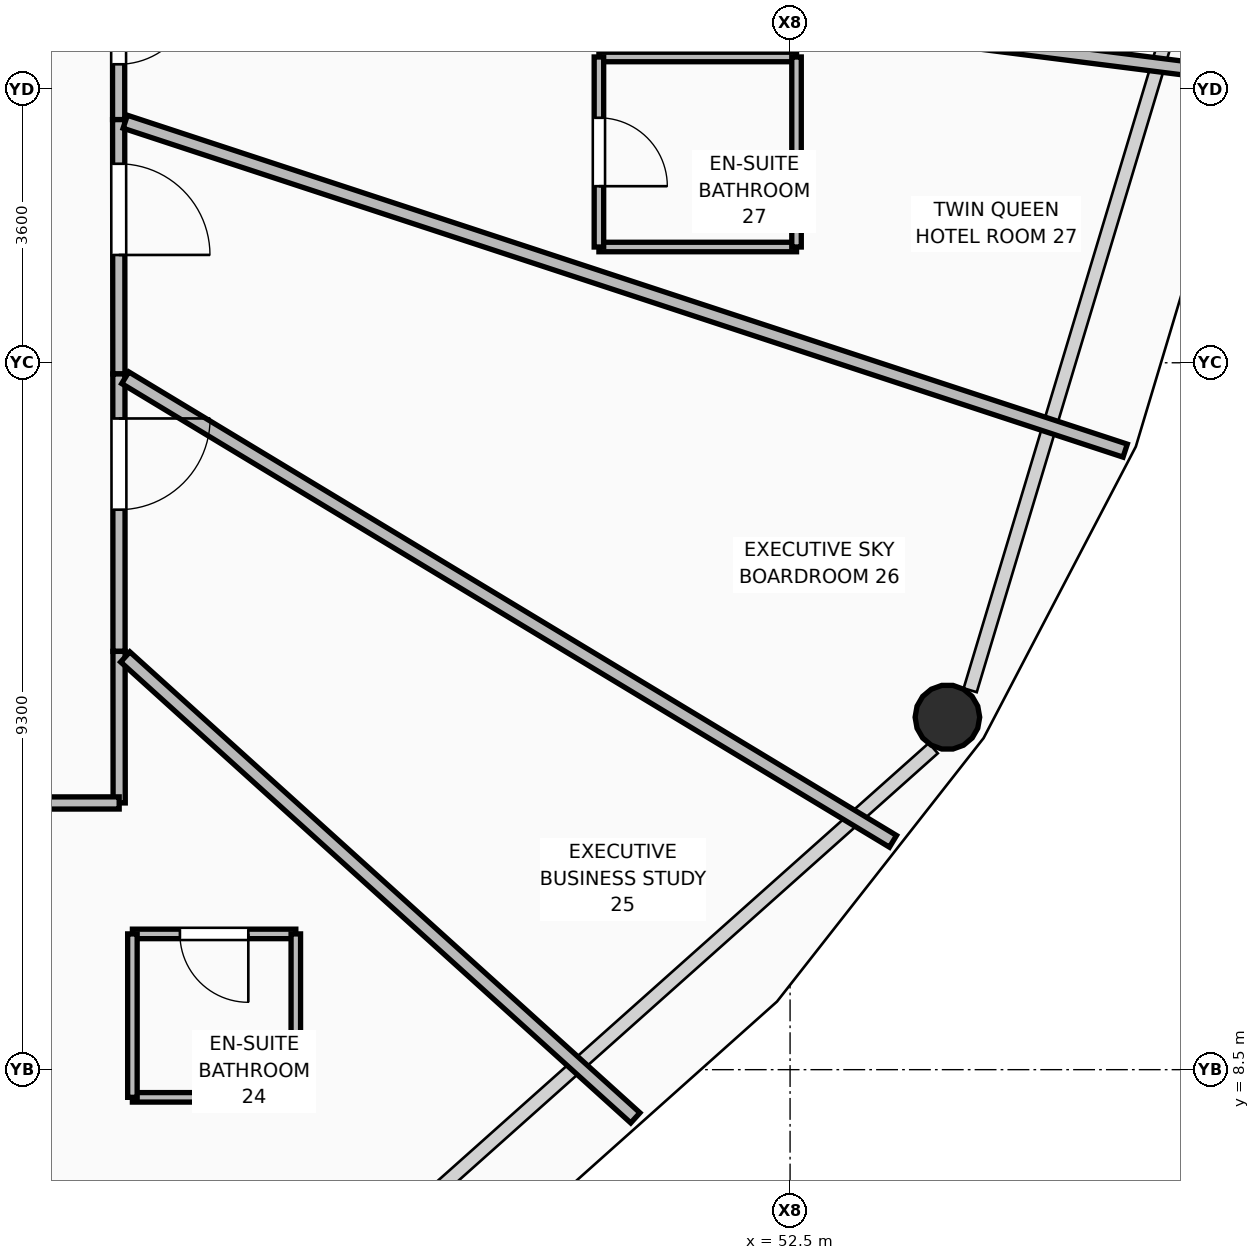
"""IFC4 building model, lengths in metres.
Left out: names, types, materials, properties, quantities, classifications, styles, units other than length and angle.
Written with IfcOpenShell. Run it as: python <this file> out.ifc"""

import sys

from ifc_helpers import new_model, si_unit, direction, frame, frame_2d, origin, origin_2d, place, context, subcontext, project, spatial, rectangle, hollow_circle, extrude, element, fill, save


model = new_model("IFC4")
c1 = context("Model", 3, precision=1e-05, world=origin(), true_north=direction((0.0, 1.0)))
c2 = subcontext(c1, "Body", "Model", "MODEL_VIEW")
j1 = project(units=[si_unit("LENGTHUNIT", "METRE"), si_unit("PLANEANGLEUNIT", "RADIAN")], contexts=[c1])
p1 = place(None, origin())
s1 = spatial("IfcSite", under=j1, at=p1, CompositionType="ELEMENT")
p2 = place(p1, origin())
s2 = spatial("IfcBuilding", under=s1, at=p2, CompositionType="ELEMENT")
p3 = place(p2, frame((0.0, 0.0, 53.25)))
s3 = spatial("IfcBuildingStorey", under=s2, at=p3, CompositionType="ELEMENT", Elevation=53.25)
p4 = place(p3, frame((54.57, 13.137, 0.0), z_axis=(0.192218909821, -0.099280833242, 0.976317165095), x_axis=(0.458902314779, 0.888486727808, 0.0)))
e1 = element("IfcColumn", 1, at=p4, inside=s3, PredefinedType="COLUMN", context=c2, shape_type="SweptSolid", body=[
    extrude(hollow_circle(Radius=0.425, WallThickness=0.04, at=origin_2d()), origin(), (0.0, 0.0, 1.0), 3.657),
])
p5 = place(p3, frame((43.665, 23.455, 0.0), z_axis=(0.0, 0.0, 1.0), x_axis=(0.000397614283, -0.999999920951, 0.0)))
e2 = element("IfcWall", 2, at=p5, inside=s3, PredefinedType="PARTITIONING", context=c2, shape_type="SweptSolid", body=[
    extrude(rectangle(XDim=2.456, YDim=0.16, at=frame_2d((1.228, 0.0))), origin(), (0.0, 0.0, 1.0), 2.928),
])
p6 = place(p5, frame((0.728, 0.0, 0.0)))
e3 = element("IfcOpeningElement", 3, at=p6, cuts=e2, PredefinedType="OPENING", context=c2, shape_type="SweptSolid", body=[
    extrude(rectangle(XDim=1.0, YDim=2.1, at=frame_2d((0.5, 1.05))), frame((0.0, 0.09, 0.0), z_axis=(0.0, -1.0, 0.0), x_axis=(1.0, 0.0, 0.0)), (0.0, 0.0, 1.0), 0.18),
])
p7 = place(p3, frame((43.666, 20.999, 0.0), z_axis=(0.0, 0.0, 1.0), x_axis=(0.000875592514, -0.999999616669, 0.0)))
e4 = element("IfcWall", 4, at=p7, inside=s3, PredefinedType="PARTITIONING", context=c2, shape_type="SweptSolid", body=[
    extrude(rectangle(XDim=3.346, YDim=0.16, at=frame_2d((1.673, 0.0))), origin(), (0.0, 0.0, 1.0), 2.928),
])
p8 = place(p7, frame((0.581, 0.0, 0.0)))
e5 = element("IfcOpeningElement", 5, at=p8, cuts=e4, PredefinedType="OPENING", context=c2, shape_type="SweptSolid", body=[
    extrude(rectangle(XDim=1.2, YDim=2.1, at=frame_2d((0.6, 1.05))), frame((0.0, 0.09, 0.0), z_axis=(0.0, -1.0, 0.0), x_axis=(1.0, 0.0, 0.0)), (0.0, 0.0, 1.0), 0.18),
])
p9 = place(p3, frame((43.669, 17.653, 0.0), z_axis=(0.0, 0.0, 1.0), x_axis=(0.000535081189, -0.999999856844, 0.0)))
e6 = element("IfcWall", 6, at=p9, inside=s3, PredefinedType="PARTITIONING", context=c2, shape_type="SweptSolid", body=[
    extrude(rectangle(XDim=3.65, YDim=0.16, at=frame_2d((1.825, 0.0))), origin(), (0.0, 0.0, 1.0), 2.928),
])
p10 = place(p9, frame((0.586, 0.0, 0.0)))
e7 = element("IfcOpeningElement", 7, at=p10, cuts=e6, PredefinedType="OPENING", context=c2, shape_type="SweptSolid", body=[
    extrude(rectangle(XDim=1.2, YDim=2.1, at=frame_2d((0.6, 1.05))), frame((0.0, 0.09, 0.0), z_axis=(0.0, -1.0, 0.0), x_axis=(1.0, 0.0, 0.0)), (0.0, 0.0, 1.0), 0.18),
])
p11 = place(p3, frame((43.671, 14.003, 0.0), z_axis=(0.0, 0.0, 1.0), x_axis=(0.001101995168, -0.999999392803, 0.0)))
e8 = element("IfcWall", 8, at=p11, inside=s3, PredefinedType="PARTITIONING", context=c2, shape_type="SweptSolid", body=[
    extrude(rectangle(XDim=1.994, YDim=0.16, at=frame_2d((0.997, 0.0))), origin(), (0.0, 0.0, 1.0), 3.55),
])
p12 = place(p3, frame((43.673, 12.009, 0.0), z_axis=(0.0, 0.0, 1.0), x_axis=(-0.999999726963, -0.000738968058, 0.0)))
e9 = element("IfcWall", 9, at=p12, inside=s3, PredefinedType="PARTITIONING", context=c2, shape_type="SweptSolid", body=[
    extrude(rectangle(XDim=6.938, YDim=0.16, at=frame_2d((3.469, 0.0))), origin(), (0.0, 0.0, 1.0), 2.928),
])
p13 = place(p12, frame((2.649, 0.0, 0.0)))
e10 = element("IfcOpeningElement", 10, at=p13, cuts=e9, PredefinedType="OPENING", context=c2, shape_type="SweptSolid", body=[
    extrude(rectangle(XDim=1.2, YDim=2.1, at=frame_2d((0.6, 1.05))), frame((0.0, 0.09, 0.0), z_axis=(0.0, -1.0, 0.0), x_axis=(1.0, 0.0, 0.0)), (0.0, 0.0, 1.0), 0.18),
])
p14 = place(p3, frame((43.753, 13.93, 0.0), z_axis=(0.0, 0.0, 1.0), x_axis=(0.741978761497, -0.670423386739, 0.0)))
e11 = element("IfcWall", 11, at=p14, inside=s3, PredefinedType="PARTITIONING", context=c2, shape_type="SweptSolid", body=[
    extrude(rectangle(XDim=9.045, YDim=0.18, at=frame_2d((4.522, 0.0))), origin(), (0.0, 0.0, 1.0), 2.775),
])
p15 = place(p3, frame((43.753, 17.603, 0.0), z_axis=(0.0, 0.0, 1.0), x_axis=(0.856050971563, -0.516891414212, 0.0)))
e12 = element("IfcWall", 12, at=p15, inside=s3, PredefinedType="PARTITIONING", context=c2, shape_type="SweptSolid", body=[
    extrude(rectangle(XDim=11.8, YDim=0.18, at=frame_2d((5.9, 0.0))), origin(), (0.0, 0.0, 1.0), 2.775),
])
p16 = place(p3, frame((43.753, 20.971, 0.0), z_axis=(0.0, 0.0, 1.0), x_axis=(0.949941417746, -0.312428076284, 0.0)))
e13 = element("IfcWall", 13, at=p16, inside=s3, PredefinedType="PARTITIONING", context=c2, shape_type="SweptSolid", body=[
    extrude(rectangle(XDim=13.849, YDim=0.18, at=frame_2d((6.925, 0.0))), origin(), (0.0, 0.0, 1.0), 2.775),
])
p17 = place(p3, frame((43.753, 23.444, 0.0), z_axis=(0.0, 0.0, 1.0), x_axis=(0.992038929139, -0.125931580921, 0.0)))
e14 = element("IfcWall", 14, at=p17, inside=s3, PredefinedType="PARTITIONING", context=c2, shape_type="SweptSolid", body=[
    extrude(rectangle(XDim=14.62, YDim=0.18, at=frame_2d((7.31, 0.0))), origin(), (0.0, 0.0, 1.0), 2.775),
])
p18 = place(p3, frame((43.847, 8.136, 0.0), z_axis=(0.0, 0.0, 1.0), x_axis=(1.0, 0.0, 0.0)))
e15 = element("IfcWall", 15, at=p18, inside=s3, PredefinedType="PARTITIONING", context=c2, shape_type="SweptSolid", body=[
    extrude(rectangle(XDim=2.15, YDim=0.125, at=frame_2d((1.075, 0.0))), origin(), (0.0, 0.0, 1.0), 2.928),
])
p19 = place(p3, frame((43.847, 10.286, 0.0), z_axis=(0.0, 0.0, 1.0), x_axis=(1.0, 0.0, 0.0)))
e16 = element("IfcWall", 16, at=p19, inside=s3, PredefinedType="PARTITIONING", context=c2, shape_type="SweptSolid", body=[
    extrude(rectangle(XDim=2.15, YDim=0.125, at=frame_2d((1.075, 0.0))), origin(), (0.0, 0.0, 1.0), 3.55),
])
p20 = place(p19, frame((0.625, 0.0, 0.0)))
e17 = element("IfcOpeningElement", 17, at=p20, cuts=e16, PredefinedType="OPENING", context=c2, shape_type="SweptSolid", body=[
    extrude(rectangle(XDim=0.9, YDim=2.1, at=frame_2d((0.45, 1.05))), frame((0.0, 0.073, 0.0), z_axis=(0.0, -1.0, 0.0), x_axis=(1.0, 0.0, 0.0)), (0.0, 0.0, 1.0), 0.145),
])
p21 = place(p3, frame((43.847, 8.136, 0.0), z_axis=(0.0, 0.0, 1.0), x_axis=(0.0, 1.0, 0.0)))
e18 = element("IfcWall", 18, at=p21, inside=s3, PredefinedType="PARTITIONING", context=c2, shape_type="SweptSolid", body=[
    extrude(rectangle(XDim=2.15, YDim=0.125, at=frame_2d((1.075, 0.0))), origin(), (0.0, 0.0, 1.0), 2.928),
])
p22 = place(p3, frame((45.997, 8.136, 0.0), z_axis=(0.0, 0.0, 1.0), x_axis=(0.0, 1.0, 0.0)))
e19 = element("IfcWall", 19, at=p22, inside=s3, PredefinedType="PARTITIONING", context=c2, shape_type="SweptSolid", body=[
    extrude(rectangle(XDim=2.15, YDim=0.125, at=frame_2d((1.075, 0.0))), origin(), (0.0, 0.0, 1.0), 3.55),
])
for number, where, z_axis, x_axis in (
    (20, (49.985, 19.323, 0.0), (0.0, 0.0, 1.0), (1.0, 0.0, 0.0)),
    (21, (49.985, 21.823, 0.0), (0.0, 0.0, 1.0), (1.0, 0.0, 0.0)),
):
    element("IfcWall", number, at=place(p3, frame(where, z_axis=z_axis, x_axis=x_axis)), inside=s3, PredefinedType="PARTITIONING", context=c2, shape_type="SweptSolid", body=[
        extrude(rectangle(XDim=2.6, YDim=0.125, at=frame_2d((1.3, 0.0))), origin(), (0.0, 0.0, 1.0), 3.55),
    ])
p23 = place(p3, frame((49.985, 19.323, 0.0), z_axis=(0.0, 0.0, 1.0), x_axis=(0.0, 1.0, 0.0)))
e22 = element("IfcWall", 22, at=p23, inside=s3, PredefinedType="PARTITIONING", context=c2, shape_type="SweptSolid", body=[
    extrude(rectangle(XDim=2.5, YDim=0.125, at=frame_2d((1.25, 0.0))), origin(), (0.0, 0.0, 1.0), 3.55),
])
p24 = place(p23, frame((0.8, 0.0, 0.0)))
e23 = element("IfcOpeningElement", 23, at=p24, cuts=e22, PredefinedType="OPENING", context=c2, shape_type="SweptSolid", body=[
    extrude(rectangle(XDim=0.9, YDim=2.1, at=frame_2d((0.45, 1.05))), frame((0.0, 0.073, 0.0), z_axis=(0.0, -1.0, 0.0), x_axis=(1.0, 0.0, 0.0)), (0.0, 0.0, 1.0), 0.145),
])
p25 = place(p3, frame((52.585, 19.323, 0.0), z_axis=(0.0, 0.0, 1.0), x_axis=(0.0, 1.0, 0.0)))
e24 = element("IfcWall", 24, at=p25, inside=s3, PredefinedType="PARTITIONING", context=c2, shape_type="SweptSolid", body=[
    extrude(rectangle(XDim=2.5, YDim=0.125, at=frame_2d((1.25, 0.0))), origin(), (0.0, 0.0, 1.0), 3.55),
])
p26 = place(p20, frame((0.9, 0.0, 0.0), z_axis=(0.0, 0.0, 1.0), x_axis=(-1.0, 0.0, 0.0)))
e25 = element("IfcDoor", 25, at=p26, inside=s3, OperationType="SINGLE_SWING_LEFT", PredefinedType="DOOR", context=c2, shape_type="SweptSolid", body=[
    extrude(rectangle(XDim=0.9, YDim=2.1, at=frame_2d((0.45, 1.05))), frame((0.0, 0.025, 0.0), z_axis=(0.0, -1.0, 0.0), x_axis=(1.0, 0.0, 0.0)), (0.0, 0.0, 1.0), 0.05),
])
fill(e17, e25)
p27 = place(p10, origin())
e26 = element("IfcDoor", 26, at=p27, inside=s3, OperationType="SINGLE_SWING_LEFT", PredefinedType="DOOR", context=c2, shape_type="SweptSolid", body=[
    extrude(rectangle(XDim=1.2, YDim=2.1, at=frame_2d((0.6, 1.05))), frame((0.0, 0.025, 0.0), z_axis=(0.0, -1.0, 0.0), x_axis=(1.0, 0.0, 0.0)), (0.0, 0.0, 1.0), 0.05),
])
fill(e7, e26)
p28 = place(p8, origin())
e27 = element("IfcDoor", 27, at=p28, inside=s3, OperationType="SINGLE_SWING_RIGHT", PredefinedType="DOOR", context=c2, shape_type="SweptSolid", body=[
    extrude(rectangle(XDim=1.2, YDim=2.1, at=frame_2d((0.6, 1.05))), frame((0.0, 0.025, 0.0), z_axis=(0.0, -1.0, 0.0), x_axis=(1.0, 0.0, 0.0)), (0.0, 0.0, 1.0), 0.05),
])
fill(e5, e27)
p29 = place(p24, frame((0.9, 0.0, 0.0), z_axis=(0.0, 0.0, 1.0), x_axis=(-1.0, 0.0, 0.0)))
e28 = element("IfcDoor", 28, at=p29, inside=s3, OperationType="SINGLE_SWING_RIGHT", PredefinedType="DOOR", context=c2, shape_type="SweptSolid", body=[
    extrude(rectangle(XDim=0.9, YDim=2.1, at=frame_2d((0.45, 1.05))), frame((0.0, 0.025, 0.0), z_axis=(0.0, -1.0, 0.0), x_axis=(1.0, 0.0, 0.0)), (0.0, 0.0, 1.0), 0.05),
])
fill(e23, e28)
p30 = place(p6, origin())
e29 = element("IfcDoor", 29, at=p30, inside=s3, OperationType="SINGLE_SWING_LEFT", PredefinedType="DOOR", context=c2, shape_type="SweptSolid", body=[
    extrude(rectangle(XDim=1.0, YDim=2.1, at=frame_2d((0.5, 1.05))), frame((0.0, 0.025, 0.0), z_axis=(0.0, -1.0, 0.0), x_axis=(1.0, 0.0, 0.0)), (0.0, 0.0, 1.0), 0.05),
])
fill(e3, e29)
save(model, sys.argv[1])
